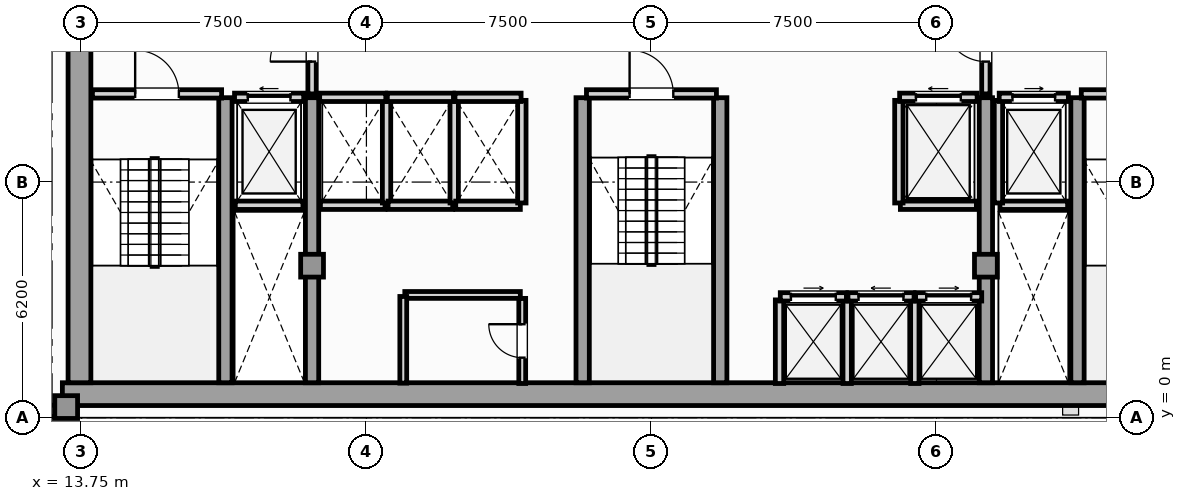
"""IFC4 building model, lengths in metres.
Left out: names, types, materials, properties, quantities, classifications, styles, units other than length and angle.
Written with IfcOpenShell. Run it as: python <this file> out.ifc"""

import sys

from ifc_helpers import new_model, si_unit, direction, frame, frame_2d, origin, origin_2d, place, context, subcontext, project, spatial, rectangle, extrude, element, fill, save


model = new_model("IFC4")
c1 = context("Model", 3, precision=1e-05, world=origin(), true_north=direction((0.0, 1.0)))
c2 = subcontext(c1, "Body", "Model", "MODEL_VIEW")
j1 = project(units=[si_unit("LENGTHUNIT", "METRE"), si_unit("PLANEANGLEUNIT", "RADIAN")], contexts=[c1])
p1 = place(None, origin())
s1 = spatial("IfcSite", under=j1, at=p1, CompositionType="ELEMENT")
p2 = place(p1, origin())
s2 = spatial("IfcBuilding", under=s1, at=p2, CompositionType="ELEMENT")
p3 = place(p2, frame((0.0, 0.0, 192.6)))
s3 = spatial("IfcBuildingStorey", under=s2, at=p3, CompositionType="ELEMENT", Elevation=192.6)
p4 = place(p3, frame((13.25, 0.62, 0.0), z_axis=(0.0, 0.0, 1.0), x_axis=(1.0, 0.0, 0.0)))
e1 = element("IfcWall", 1, at=p4, inside=s3, PredefinedType="SHEAR", context=c2, shape_type="SweptSolid", body=[
    extrude(rectangle(XDim=31.0, YDim=0.6, at=frame_2d((15.5, 0.0))), origin(), (0.0, 0.0, 1.0), 3.63),
])
p5 = place(p3, frame((13.7, 0.92, 0.0), z_axis=(0.0, 0.0, 1.0), x_axis=(0.0, 1.0, 0.0)))
e2 = element("IfcWall", 2, at=p5, inside=s3, PredefinedType="SHEAR", context=c2, shape_type="SweptSolid", body=[
    extrude(rectangle(XDim=10.53, YDim=0.6, at=frame_2d((5.265, 0.0))), origin(), (0.0, 0.0, 1.0), 3.63),
])
for number, where, z_axis, x_axis in (
    (3, (17.54, 0.92, 0.0), (0.0, 0.0, 1.0), (0.0, 1.0, 0.0)),
    (4, (19.82, 0.92, 0.0), (0.0, 0.0, 1.0), (0.0, 1.0, 0.0)),
    (5, (26.94, 0.92, 0.0), (0.0, 0.0, 1.0), (0.0, 1.0, 0.0)),
    (6, (30.56, 0.92, 0.0), (0.0, 0.0, 1.0), (0.0, 1.0, 0.0)),
    (7, (37.55, 0.92, 0.0), (0.0, 0.0, 1.0), (0.0, 1.0, 0.0)),
    (8, (39.96, 0.92, 0.0), (0.0, 0.0, 1.0), (0.0, 1.0, 0.0)),
):
    element("IfcWall", number, at=place(p3, frame(where, z_axis=z_axis, x_axis=x_axis)), inside=s3, PredefinedType="SHEAR", context=c2, shape_type="SweptSolid", body=[
        extrude(rectangle(XDim=7.5, YDim=0.35, at=frame_2d((3.75, 0.0))), origin(), (0.0, 0.0, 1.0), 3.63),
    ])
for number, where, z_axis, x_axis in (
    (9, (13.35, 0.28, 0.0), (0.0, 0.0, 1.0), (1.0, 0.0, 0.0)),
    (10, (19.82, 4.0, 0.0), (0.0, 0.0, 1.0), (1.0, 0.0, 0.0)),
    (11, (37.55, 4.0, 0.0), (0.0, 0.0, 1.0), (1.0, 0.0, 0.0)),
):
    element("IfcColumn", number, at=place(p3, frame(where, z_axis=z_axis, x_axis=x_axis)), inside=s3, PredefinedType="COLUMN", context=c2, shape_type="SweptSolid", body=[
        extrude(rectangle(XDim=0.6, YDim=0.6, at=origin_2d()), origin(), (0.0, 0.0, 1.0), 3.85),
    ])
p6 = place(p3, frame((8.44, 0.18, 0.0), z_axis=(0.0, 0.0, 1.0), x_axis=(1.0, 0.0, 0.0)))
e12 = element("IfcWall", 12, at=p6, inside=s3, PredefinedType="SOLIDWALL", context=c2, shape_type="SweptSolid", body=[
    extrude(rectangle(XDim=4.81, YDim=0.3, at=frame_2d((2.405, 0.0))), origin(), (0.0, 0.0, 1.0), 3.63),
])
p7 = place(p6, frame((1.355, 0.0, 0.85)))
e13 = element("IfcOpeningElement", 13, at=p7, cuts=e12, PredefinedType="OPENING", context=c2, shape_type="SweptSolid", body=[
    extrude(rectangle(XDim=2.1, YDim=2.05, at=frame_2d((1.05, 1.025))), frame((0.0, 0.16, 0.0), z_axis=(0.0, -1.0, 0.0), x_axis=(1.0, 0.0, 0.0)), (0.0, 0.0, 1.0), 0.32),
])
p8 = place(p3, frame((17.8, 5.59, 0.0), z_axis=(0.0, 0.0, 1.0), x_axis=(1.0, 0.0, 0.0)))
e14 = element("IfcWall", 14, at=p8, inside=s3, PredefinedType="SOLIDWALL", context=c2, shape_type="SweptSolid", body=[
    extrude(rectangle(XDim=1.78, YDim=0.22, at=frame_2d((0.89, 0.0))), origin(), (0.0, 0.0, 1.0), 3.63),
])
p9 = place(p3, frame((17.78, 8.43, 0.0), z_axis=(0.0, 0.0, 1.0), x_axis=(1.0, 0.0, 0.0)))
e15 = element("IfcWall", 15, at=p9, inside=s3, PredefinedType="SOLIDWALL", context=c2, shape_type="SweptSolid", body=[
    extrude(rectangle(XDim=1.82, YDim=0.22, at=frame_2d((0.91, 0.0))), origin(), (0.0, 0.0, 1.0), 3.63),
])
p10 = place(p9, frame((0.35, 0.0, 0.0)))
e16 = element("IfcOpeningElement", 16, at=p10, cuts=e15, PredefinedType="OPENING", context=c2, shape_type="SweptSolid", body=[
    extrude(rectangle(XDim=1.12, YDim=2.25, at=frame_2d((0.56, 1.125))), frame((0.0, 0.12, 0.0), z_axis=(0.0, -1.0, 0.0), x_axis=(1.0, 0.0, 0.0)), (0.0, 0.0, 1.0), 0.24),
])
p11 = place(p3, frame((37.92, 5.59, 0.0), z_axis=(0.0, 0.0, 1.0), x_axis=(1.0, 0.0, 0.0)))
e17 = element("IfcWall", 17, at=p11, inside=s3, PredefinedType="SOLIDWALL", context=c2, shape_type="SweptSolid", body=[
    extrude(rectangle(XDim=1.78, YDim=0.22, at=frame_2d((0.89, 0.0))), origin(), (0.0, 0.0, 1.0), 3.63),
])
p12 = place(p3, frame((37.88, 5.65, 0.0), z_axis=(0.0, 0.0, 1.0), x_axis=(0.0, 1.0, 0.0)))
e18 = element("IfcWall", 18, at=p12, inside=s3, PredefinedType="SOLIDWALL", context=c2, shape_type="SweptSolid", body=[
    extrude(rectangle(XDim=2.7, YDim=0.22, at=frame_2d((1.35, 0.0))), origin(), (0.0, 0.0, 1.0), 3.63),
])
p13 = place(p3, frame((37.9, 8.43, 0.0), z_axis=(0.0, 0.0, 1.0), x_axis=(1.0, 0.0, 0.0)))
e19 = element("IfcWall", 19, at=p13, inside=s3, PredefinedType="SOLIDWALL", context=c2, shape_type="SweptSolid", body=[
    extrude(rectangle(XDim=1.82, YDim=0.22, at=frame_2d((0.91, 0.0))), origin(), (0.0, 0.0, 1.0), 3.63),
])
p14 = place(p13, frame((0.35, 0.0, 0.0)))
e20 = element("IfcOpeningElement", 20, at=p14, cuts=e19, PredefinedType="OPENING", context=c2, shape_type="SweptSolid", body=[
    extrude(rectangle(XDim=1.12, YDim=2.25, at=frame_2d((0.56, 1.125))), frame((0.0, 0.12, 0.0), z_axis=(0.0, -1.0, 0.0), x_axis=(1.0, 0.0, 0.0)), (0.0, 0.0, 1.0), 0.24),
])
p15 = place(p3, frame((35.3, 5.59, 0.0), z_axis=(0.0, 0.0, 1.0), x_axis=(1.0, 0.0, 0.0)))
e21 = element("IfcWall", 21, at=p15, inside=s3, PredefinedType="SOLIDWALL", context=c2, shape_type="SweptSolid", body=[
    extrude(rectangle(XDim=2.0, YDim=0.22, at=frame_2d((1.0, 0.0))), origin(), (0.0, 0.0, 1.0), 3.63),
])
p16 = place(p3, frame((35.26, 5.65, 0.0), z_axis=(0.0, 0.0, 1.0), x_axis=(0.0, 1.0, 0.0)))
e22 = element("IfcWall", 22, at=p16, inside=s3, PredefinedType="SOLIDWALL", context=c2, shape_type="SweptSolid", body=[
    extrude(rectangle(XDim=2.7, YDim=0.22, at=frame_2d((1.35, 0.0))), origin(), (0.0, 0.0, 1.0), 3.63),
])
p17 = place(p3, frame((35.28, 8.43, 0.0), z_axis=(0.0, 0.0, 1.0), x_axis=(1.0, 0.0, 0.0)))
e23 = element("IfcWall", 23, at=p17, inside=s3, PredefinedType="SOLIDWALL", context=c2, shape_type="SweptSolid", body=[
    extrude(rectangle(XDim=2.04, YDim=0.22, at=frame_2d((1.02, 0.0))), origin(), (0.0, 0.0, 1.0), 3.63),
])
p18 = place(p17, frame((0.43, 0.0, 0.0)))
e24 = element("IfcOpeningElement", 24, at=p18, cuts=e23, PredefinedType="OPENING", context=c2, shape_type="SweptSolid", body=[
    extrude(rectangle(XDim=1.18, YDim=2.2, at=frame_2d((0.59, 1.1))), frame((0.0, 0.12, 0.0), z_axis=(0.0, -1.0, 0.0), x_axis=(1.0, 0.0, 0.0)), (0.0, 0.0, 1.0), 0.24),
])
for number, where, z_axis, x_axis in (
    (25, (32.12, 0.9, 0.0), (0.0, 0.0, 1.0), (0.0, 1.0, 0.0)),
    (26, (33.9, 0.9, 0.0), (0.0, 0.0, 1.0), (0.0, 1.0, 0.0)),
):
    element("IfcWall", number, at=place(p3, frame(where, z_axis=z_axis, x_axis=x_axis)), inside=s3, PredefinedType="SOLIDWALL", context=c2, shape_type="SweptSolid", body=[
        extrude(rectangle(XDim=2.2, YDim=0.22, at=frame_2d((1.1, 0.0))), origin(), (0.0, 0.0, 1.0), 3.63),
    ])
p19 = place(p3, frame((32.14, 3.18, 0.0), z_axis=(0.0, 0.0, 1.0), x_axis=(1.0, 0.0, 0.0)))
e27 = element("IfcWall", 27, at=p19, inside=s3, PredefinedType="SOLIDWALL", context=c2, shape_type="SweptSolid", body=[
    extrude(rectangle(XDim=1.74, YDim=0.22, at=frame_2d((0.87, 0.0))), origin(), (0.0, 0.0, 1.0), 3.63),
])
p20 = place(p19, frame((0.28, 0.0, 0.0)))
e28 = element("IfcOpeningElement", 28, at=p20, cuts=e27, PredefinedType="OPENING", context=c2, shape_type="SweptSolid", body=[
    extrude(rectangle(XDim=1.18, YDim=2.2, at=frame_2d((0.59, 1.1))), frame((0.0, 0.12, 0.0), z_axis=(0.0, -1.0, 0.0), x_axis=(1.0, 0.0, 0.0)), (0.0, 0.0, 1.0), 0.24),
])
p21 = place(p3, frame((35.68, 0.9, 0.0), z_axis=(0.0, 0.0, 1.0), x_axis=(0.0, 1.0, 0.0)))
e29 = element("IfcWall", 29, at=p21, inside=s3, PredefinedType="SOLIDWALL", context=c2, shape_type="SweptSolid", body=[
    extrude(rectangle(XDim=2.2, YDim=0.22, at=frame_2d((1.1, 0.0))), origin(), (0.0, 0.0, 1.0), 3.63),
])
p22 = place(p3, frame((33.92, 3.18, 0.0), z_axis=(0.0, 0.0, 1.0), x_axis=(1.0, 0.0, 0.0)))
e30 = element("IfcWall", 30, at=p22, inside=s3, PredefinedType="SOLIDWALL", context=c2, shape_type="SweptSolid", body=[
    extrude(rectangle(XDim=1.74, YDim=0.22, at=frame_2d((0.87, 0.0))), origin(), (0.0, 0.0, 1.0), 3.63),
])
p23 = place(p22, frame((0.28, 0.0, 0.0)))
e31 = element("IfcOpeningElement", 31, at=p23, cuts=e30, PredefinedType="OPENING", context=c2, shape_type="SweptSolid", body=[
    extrude(rectangle(XDim=1.18, YDim=2.2, at=frame_2d((0.59, 1.1))), frame((0.0, 0.12, 0.0), z_axis=(0.0, -1.0, 0.0), x_axis=(1.0, 0.0, 0.0)), (0.0, 0.0, 1.0), 0.24),
])
p24 = place(p3, frame((35.7, 3.18, 0.0), z_axis=(0.0, 0.0, 1.0), x_axis=(1.0, 0.0, 0.0)))
e32 = element("IfcWall", 32, at=p24, inside=s3, PredefinedType="SOLIDWALL", context=c2, shape_type="SweptSolid", body=[
    extrude(rectangle(XDim=1.74, YDim=0.22, at=frame_2d((0.87, 0.0))), origin(), (0.0, 0.0, 1.0), 3.63),
])
p25 = place(p24, frame((0.28, 0.0, 0.0)))
e33 = element("IfcOpeningElement", 33, at=p25, cuts=e32, PredefinedType="OPENING", context=c2, shape_type="SweptSolid", body=[
    extrude(rectangle(XDim=1.18, YDim=2.2, at=frame_2d((0.59, 1.1))), frame((0.0, 0.12, 0.0), z_axis=(0.0, -1.0, 0.0), x_axis=(1.0, 0.0, 0.0)), (0.0, 0.0, 1.0), 0.24),
])
p26 = place(p3, frame((20.04, 5.59, 0.0), z_axis=(0.0, 0.0, 1.0), x_axis=(1.0, 0.0, 0.0)))
e34 = element("IfcWall", 34, at=p26, inside=s3, PredefinedType="SOLIDWALL", context=c2, shape_type="SweptSolid", body=[
    extrude(rectangle(XDim=1.7, YDim=0.22, at=frame_2d((0.85, 0.0))), origin(), (0.0, 0.0, 1.0), 3.63),
])
p27 = place(p3, frame((21.78, 5.65, 0.0), z_axis=(0.0, 0.0, 1.0), x_axis=(0.0, 1.0, 0.0)))
e35 = element("IfcWall", 35, at=p27, inside=s3, PredefinedType="SOLIDWALL", context=c2, shape_type="SweptSolid", body=[
    extrude(rectangle(XDim=2.7, YDim=0.22, at=frame_2d((1.35, 0.0))), origin(), (0.0, 0.0, 1.0), 3.63),
])
p28 = place(p3, frame((20.02, 8.43, 0.0), z_axis=(0.0, 0.0, 1.0), x_axis=(1.0, 0.0, 0.0)))
e36 = element("IfcWall", 36, at=p28, inside=s3, PredefinedType="SOLIDWALL", context=c2, shape_type="SweptSolid", body=[
    extrude(rectangle(XDim=1.74, YDim=0.22, at=frame_2d((0.87, 0.0))), origin(), (0.0, 0.0, 1.0), 3.63),
])
p29 = place(p3, frame((21.82, 5.59, 0.0), z_axis=(0.0, 0.0, 1.0), x_axis=(1.0, 0.0, 0.0)))
e37 = element("IfcWall", 37, at=p29, inside=s3, PredefinedType="SOLIDWALL", context=c2, shape_type="SweptSolid", body=[
    extrude(rectangle(XDim=1.7, YDim=0.22, at=frame_2d((0.85, 0.0))), origin(), (0.0, 0.0, 1.0), 3.63),
])
p30 = place(p3, frame((23.56, 5.65, 0.0), z_axis=(0.0, 0.0, 1.0), x_axis=(0.0, 1.0, 0.0)))
e38 = element("IfcWall", 38, at=p30, inside=s3, PredefinedType="SOLIDWALL", context=c2, shape_type="SweptSolid", body=[
    extrude(rectangle(XDim=2.7, YDim=0.22, at=frame_2d((1.35, 0.0))), origin(), (0.0, 0.0, 1.0), 3.63),
])
p31 = place(p3, frame((21.8, 8.43, 0.0), z_axis=(0.0, 0.0, 1.0), x_axis=(1.0, 0.0, 0.0)))
e39 = element("IfcWall", 39, at=p31, inside=s3, PredefinedType="SOLIDWALL", context=c2, shape_type="SweptSolid", body=[
    extrude(rectangle(XDim=1.74, YDim=0.22, at=frame_2d((0.87, 0.0))), origin(), (0.0, 0.0, 1.0), 3.63),
])
p32 = place(p3, frame((23.6, 5.59, 0.0), z_axis=(0.0, 0.0, 1.0), x_axis=(1.0, 0.0, 0.0)))
e40 = element("IfcWall", 40, at=p32, inside=s3, PredefinedType="SOLIDWALL", context=c2, shape_type="SweptSolid", body=[
    extrude(rectangle(XDim=1.7, YDim=0.22, at=frame_2d((0.85, 0.0))), origin(), (0.0, 0.0, 1.0), 3.63),
])
p33 = place(p3, frame((25.34, 5.65, 0.0), z_axis=(0.0, 0.0, 1.0), x_axis=(0.0, 1.0, 0.0)))
e41 = element("IfcWall", 41, at=p33, inside=s3, PredefinedType="SOLIDWALL", context=c2, shape_type="SweptSolid", body=[
    extrude(rectangle(XDim=2.7, YDim=0.22, at=frame_2d((1.35, 0.0))), origin(), (0.0, 0.0, 1.0), 3.63),
])
p34 = place(p3, frame((23.58, 8.43, 0.0), z_axis=(0.0, 0.0, 1.0), x_axis=(1.0, 0.0, 0.0)))
e42 = element("IfcWall", 42, at=p34, inside=s3, PredefinedType="SOLIDWALL", context=c2, shape_type="SweptSolid", body=[
    extrude(rectangle(XDim=1.74, YDim=0.22, at=frame_2d((0.87, 0.0))), origin(), (0.0, 0.0, 1.0), 3.63),
])
p35 = place(p3, frame((14.04, 8.52, 0.0), z_axis=(0.0, 0.0, 1.0), x_axis=(1.0, 0.0, 0.0)))
e43 = element("IfcWall", 43, at=p35, inside=s3, PredefinedType="SOLIDWALL", context=c2, shape_type="SweptSolid", body=[
    extrude(rectangle(XDim=3.4, YDim=0.22, at=frame_2d((1.7, 0.0))), origin(), (0.0, 0.0, 1.0), 3.63),
])
p36 = place(p35, frame((1.125, 0.0, 0.0)))
e44 = element("IfcOpeningElement", 44, at=p36, cuts=e43, PredefinedType="OPENING", context=c2, shape_type="SweptSolid", body=[
    extrude(rectangle(XDim=1.15, YDim=2.2, at=frame_2d((0.575, 1.1))), frame((0.0, 0.12, 0.0), z_axis=(0.0, -1.0, 0.0), x_axis=(1.0, 0.0, 0.0)), (0.0, 0.0, 1.0), 0.24),
])
p37 = place(p3, frame((40.06, 8.52, 0.0), z_axis=(0.0, 0.0, 1.0), x_axis=(1.0, 0.0, 0.0)))
e45 = element("IfcWall", 45, at=p37, inside=s3, PredefinedType="SOLIDWALL", context=c2, shape_type="SweptSolid", body=[
    extrude(rectangle(XDim=3.4, YDim=0.22, at=frame_2d((1.7, 0.0))), origin(), (0.0, 0.0, 1.0), 3.63),
])
p38 = place(p37, frame((1.125, 0.0, 0.0)))
e46 = element("IfcOpeningElement", 46, at=p38, cuts=e45, PredefinedType="OPENING", context=c2, shape_type="SweptSolid", body=[
    extrude(rectangle(XDim=1.15, YDim=2.2, at=frame_2d((0.575, 1.1))), frame((0.0, 0.12, 0.0), z_axis=(0.0, -1.0, 0.0), x_axis=(1.0, 0.0, 0.0)), (0.0, 0.0, 1.0), 0.24),
])
p39 = place(p3, frame((27.04, 8.52, 0.0), z_axis=(0.0, 0.0, 1.0), x_axis=(1.0, 0.0, 0.0)))
e47 = element("IfcWall", 47, at=p39, inside=s3, PredefinedType="SOLIDWALL", context=c2, shape_type="SweptSolid", body=[
    extrude(rectangle(XDim=3.42, YDim=0.22, at=frame_2d((1.71, 0.0))), origin(), (0.0, 0.0, 1.0), 3.63),
])
p40 = place(p39, frame((1.135, 0.0, 0.0)))
e48 = element("IfcOpeningElement", 48, at=p40, cuts=e47, PredefinedType="OPENING", context=c2, shape_type="SweptSolid", body=[
    extrude(rectangle(XDim=1.15, YDim=2.2, at=frame_2d((0.575, 1.1))), frame((0.0, 0.12, 0.0), z_axis=(0.0, -1.0, 0.0), x_axis=(1.0, 0.0, 0.0)), (0.0, 0.0, 1.0), 0.24),
])
p41 = place(p3, frame((19.82, 8.52, 0.0), z_axis=(0.0, 0.0, 1.0), x_axis=(0.0, 1.0, 0.0)))
e49 = element("IfcWall", 49, at=p41, inside=s3, PredefinedType="SOLIDWALL", context=c2, shape_type="SweptSolid", body=[
    extrude(rectangle(XDim=2.8, YDim=0.22, at=frame_2d((1.4, 0.0))), origin(), (0.0, 0.0, 1.0), 3.085),
])
p42 = place(p41, frame((0.85, 0.0, 0.0)))
e50 = element("IfcOpeningElement", 50, at=p42, cuts=e49, PredefinedType="OPENING", context=c2, shape_type="SweptSolid", body=[
    extrude(rectangle(XDim=1.1, YDim=2.2, at=frame_2d((0.55, 1.1))), frame((0.0, 0.12, 0.0), z_axis=(0.0, -1.0, 0.0), x_axis=(1.0, 0.0, 0.0)), (0.0, 0.0, 1.0), 0.24),
])
p43 = place(p3, frame((37.55, 8.52, 0.0), z_axis=(0.0, 0.0, 1.0), x_axis=(0.0, 1.0, 0.0)))
e51 = element("IfcWall", 51, at=p43, inside=s3, PredefinedType="SOLIDWALL", context=c2, shape_type="SweptSolid", body=[
    extrude(rectangle(XDim=2.8, YDim=0.22, at=frame_2d((1.4, 0.0))), origin(), (0.0, 0.0, 1.0), 3.085),
])
p44 = place(p43, frame((0.85, 0.0, 0.0)))
e52 = element("IfcOpeningElement", 52, at=p44, cuts=e51, PredefinedType="OPENING", context=c2, shape_type="SweptSolid", body=[
    extrude(rectangle(XDim=1.1, YDim=2.2, at=frame_2d((0.55, 1.1))), frame((0.0, 0.12, 0.0), z_axis=(0.0, -1.0, 0.0), x_axis=(1.0, 0.0, 0.0)), (0.0, 0.0, 1.0), 0.24),
])
p45 = place(p3, frame((25.35, 0.9, 0.0), z_axis=(0.0, 0.0, 1.0), x_axis=(0.0, 1.0, 0.0)))
e53 = element("IfcWall", 53, at=p45, inside=s3, PredefinedType="PARTITIONING", context=c2, shape_type="SweptSolid", body=[
    extrude(rectangle(XDim=2.24, YDim=0.18, at=frame_2d((1.12, 0.0))), origin(), (0.0, 0.0, 1.0), 3.63),
])
p46 = place(p45, frame((0.68, 0.0, 0.0)))
e54 = element("IfcOpeningElement", 54, at=p46, cuts=e53, PredefinedType="OPENING", context=c2, shape_type="SweptSolid", body=[
    extrude(rectangle(XDim=0.88, YDim=2.05, at=frame_2d((0.44, 1.025))), frame((0.0, 0.1, 0.0), z_axis=(0.0, -1.0, 0.0), x_axis=(1.0, 0.0, 0.0)), (0.0, 0.0, 1.0), 0.2),
])
p47 = place(p3, frame((22.26, 3.23, 0.0), z_axis=(0.0, 0.0, 1.0), x_axis=(1.0, 0.0, 0.0)))
e55 = element("IfcWall", 55, at=p47, inside=s3, PredefinedType="PARTITIONING", context=c2, shape_type="SweptSolid", body=[
    extrude(rectangle(XDim=3.04, YDim=0.18, at=frame_2d((1.52, 0.0))), origin(), (0.0, 0.0, 1.0), 3.63),
])
p48 = place(p3, frame((22.22, 0.91, 0.0), z_axis=(0.0, 0.0, 1.0), x_axis=(0.0, 1.0, 0.0)))
e56 = element("IfcWall", 56, at=p48, inside=s3, PredefinedType="PARTITIONING", context=c2, shape_type="SweptSolid", body=[
    extrude(rectangle(XDim=2.28, YDim=0.18, at=frame_2d((1.14, 0.0))), origin(), (0.0, 0.0, 1.0), 3.63),
])
p49 = place(p10, origin())
e57 = element("IfcDoor", 57, at=p49, inside=s3, OperationType="SLIDING_TO_LEFT", PredefinedType="DOOR", context=c2, shape_type="SweptSolid", body=[
    extrude(rectangle(XDim=1.12, YDim=2.25, at=frame_2d((0.56, 1.125))), frame((0.0, 0.025, 0.0), z_axis=(0.0, -1.0, 0.0), x_axis=(1.0, 0.0, 0.0)), (0.0, 0.0, 1.0), 0.05),
])
fill(e16, e57)
p50 = place(p14, origin())
e58 = element("IfcDoor", 58, at=p50, inside=s3, OperationType="SLIDING_TO_RIGHT", PredefinedType="DOOR", context=c2, shape_type="SweptSolid", body=[
    extrude(rectangle(XDim=1.12, YDim=2.25, at=frame_2d((0.56, 1.125))), frame((0.0, 0.025, 0.0), z_axis=(0.0, -1.0, 0.0), x_axis=(1.0, 0.0, 0.0)), (0.0, 0.0, 1.0), 0.05),
])
fill(e20, e58)
p51 = place(p18, origin())
e59 = element("IfcDoor", 59, at=p51, inside=s3, OperationType="SLIDING_TO_LEFT", PredefinedType="DOOR", context=c2, shape_type="SweptSolid", body=[
    extrude(rectangle(XDim=1.18, YDim=2.2, at=frame_2d((0.59, 1.1))), frame((0.0, 0.025, 0.0), z_axis=(0.0, -1.0, 0.0), x_axis=(1.0, 0.0, 0.0)), (0.0, 0.0, 1.0), 0.05),
])
fill(e24, e59)
p52 = place(p20, origin())
e60 = element("IfcDoor", 60, at=p52, inside=s3, OperationType="SLIDING_TO_RIGHT", PredefinedType="DOOR", context=c2, shape_type="SweptSolid", body=[
    extrude(rectangle(XDim=1.18, YDim=2.2, at=frame_2d((0.59, 1.1))), frame((0.0, 0.025, 0.0), z_axis=(0.0, -1.0, 0.0), x_axis=(1.0, 0.0, 0.0)), (0.0, 0.0, 1.0), 0.05),
])
fill(e28, e60)
p53 = place(p23, origin())
e61 = element("IfcDoor", 61, at=p53, inside=s3, OperationType="SLIDING_TO_LEFT", PredefinedType="DOOR", context=c2, shape_type="SweptSolid", body=[
    extrude(rectangle(XDim=1.18, YDim=2.2, at=frame_2d((0.59, 1.1))), frame((0.0, 0.025, 0.0), z_axis=(0.0, -1.0, 0.0), x_axis=(1.0, 0.0, 0.0)), (0.0, 0.0, 1.0), 0.05),
])
fill(e31, e61)
p54 = place(p25, origin())
e62 = element("IfcDoor", 62, at=p54, inside=s3, OperationType="SLIDING_TO_RIGHT", PredefinedType="DOOR", context=c2, shape_type="SweptSolid", body=[
    extrude(rectangle(XDim=1.18, YDim=2.2, at=frame_2d((0.59, 1.1))), frame((0.0, 0.025, 0.0), z_axis=(0.0, -1.0, 0.0), x_axis=(1.0, 0.0, 0.0)), (0.0, 0.0, 1.0), 0.05),
])
fill(e33, e62)
p55 = place(p36, origin())
e63 = element("IfcDoor", 63, at=p55, inside=s3, OperationType="SINGLE_SWING_LEFT", PredefinedType="DOOR", context=c2, shape_type="SweptSolid", body=[
    extrude(rectangle(XDim=1.15, YDim=2.2, at=frame_2d((0.575, 1.1))), frame((0.0, 0.025, 0.0), z_axis=(0.0, -1.0, 0.0), x_axis=(1.0, 0.0, 0.0)), (0.0, 0.0, 1.0), 0.05),
])
fill(e44, e63)
p56 = place(p40, origin())
e64 = element("IfcDoor", 64, at=p56, inside=s3, OperationType="SINGLE_SWING_LEFT", PredefinedType="DOOR", context=c2, shape_type="SweptSolid", body=[
    extrude(rectangle(XDim=1.15, YDim=2.2, at=frame_2d((0.575, 1.1))), frame((0.0, 0.025, 0.0), z_axis=(0.0, -1.0, 0.0), x_axis=(1.0, 0.0, 0.0)), (0.0, 0.0, 1.0), 0.05),
])
fill(e48, e64)
p57 = place(p42, origin())
e65 = element("IfcDoor", 65, at=p57, inside=s3, OperationType="SINGLE_SWING_LEFT", PredefinedType="DOOR", context=c2, shape_type="SweptSolid", body=[
    extrude(rectangle(XDim=1.1, YDim=2.2, at=frame_2d((0.55, 1.1))), frame((0.0, 0.025, 0.0), z_axis=(0.0, -1.0, 0.0), x_axis=(1.0, 0.0, 0.0)), (0.0, 0.0, 1.0), 0.05),
])
fill(e50, e65)
p58 = place(p44, origin())
e66 = element("IfcDoor", 66, at=p58, inside=s3, OperationType="SINGLE_SWING_RIGHT", PredefinedType="DOOR", context=c2, shape_type="SweptSolid", body=[
    extrude(rectangle(XDim=1.1, YDim=2.2, at=frame_2d((0.55, 1.1))), frame((0.0, 0.025, 0.0), z_axis=(0.0, -1.0, 0.0), x_axis=(1.0, 0.0, 0.0)), (0.0, 0.0, 1.0), 0.05),
])
fill(e52, e66)
p59 = place(p46, origin())
e67 = element("IfcDoor", 67, at=p59, inside=s3, OperationType="SINGLE_SWING_RIGHT", PredefinedType="DOOR", context=c2, shape_type="SweptSolid", body=[
    extrude(rectangle(XDim=0.88, YDim=2.05, at=frame_2d((0.44, 1.025))), frame((0.0, 0.025, 0.0), z_axis=(0.0, -1.0, 0.0), x_axis=(1.0, 0.0, 0.0)), (0.0, 0.0, 1.0), 0.05),
])
fill(e54, e67)
save(model, sys.argv[1])
